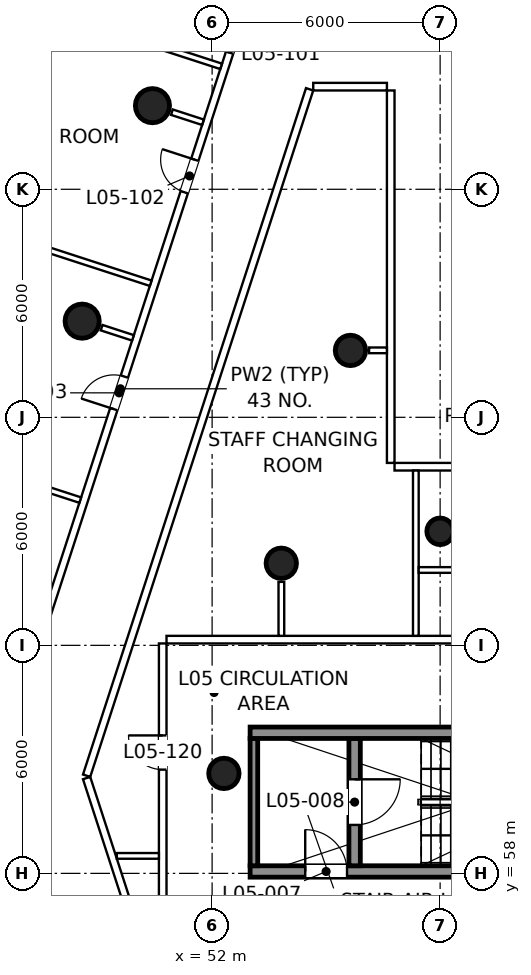
"""IFC4 building model, lengths in metres.
Left out: names, types, materials, properties, quantities, classifications, styles, units other than length and angle.
Written with IfcOpenShell. Run it as: python <this file> out.ifc"""

import sys

from ifc_helpers import new_model, si_unit, direction, frame, frame_2d, origin, origin_2d, place, context, subcontext, project, spatial, rectangle, circle, extrude, element, fill, save


model = new_model("IFC4")
c1 = context("Model", 3, precision=1e-05, world=origin(), true_north=direction((0.0, 1.0)))
c2 = subcontext(c1, "Body", "Model", "MODEL_VIEW")
j1 = project(units=[si_unit("LENGTHUNIT", "METRE"), si_unit("PLANEANGLEUNIT", "RADIAN")], contexts=[c1])
p1 = place(None, origin())
s1 = spatial("IfcSite", under=j1, at=p1, CompositionType="ELEMENT")
p2 = place(p1, origin())
s2 = spatial("IfcBuilding", under=s1, at=p2, CompositionType="ELEMENT")
p3 = place(p2, frame((0.0, 0.0, 34.0)))
s3 = spatial("IfcBuildingStorey", under=s2, at=p3, CompositionType="ELEMENT", Elevation=34.0)
for number, where, z_axis, x_axis in (
    (1, (50.43, 78.2, 0.0), (0.0, 0.0, 1.0), (1.0, 0.0, 0.0)),
    (2, (48.58, 72.53, 0.0), (0.0, 0.0, 1.0), (1.0, 0.0, 0.0)),
):
    element("IfcColumn", number, at=place(p3, frame(where, z_axis=z_axis, x_axis=x_axis)), inside=s3, PredefinedType="COLUMN", context=c2, shape_type="SweptSolid", body=[
        extrude(circle(Radius=0.45, at=origin_2d()), origin(), (0.0, 0.0, 1.0), 5.0),
    ])
for number, where, z_axis, x_axis in (
    (3, (52.31, 60.63, 0.0), (0.0, 0.0, 1.0), (1.0, 0.0, 0.0)),
    (4, (55.64, 71.76, 0.0), (0.0, 0.0, 1.0), (1.0, 0.0, 0.0)),
    (5, (53.82, 66.16, 0.0), (0.0, 0.0, 1.0), (1.0, 0.0, 0.0)),
):
    element("IfcColumn", number, at=place(p3, frame(where, z_axis=z_axis, x_axis=x_axis)), inside=s3, PredefinedType="COLUMN", context=c2, shape_type="SweptSolid", body=[
        extrude(circle(Radius=0.4, at=origin_2d()), origin(), (0.0, 0.0, 1.0), 5.0),
    ])
p4 = place(p3, frame((58.0, 67.0, 0.0), z_axis=(0.0, 0.0, 1.0), x_axis=(1.0, 0.0, 0.0)))
e6 = element("IfcColumn", 6, at=p4, inside=s3, PredefinedType="COLUMN", context=c2, shape_type="SweptSolid", body=[
    extrude(circle(Radius=0.35, at=origin_2d()), origin(), (0.0, 0.0, 1.0), 5.0),
])
p5 = place(p3, frame((53.0, 58.05, 0.0), z_axis=(0.0, 0.0, 1.0), x_axis=(1.0, 0.0, 0.0)))
e7 = element("IfcWall", 7, at=p5, inside=s3, PredefinedType="SHEAR", context=c2, shape_type="SweptSolid", body=[
    extrude(rectangle(XDim=11.9, YDim=0.3, at=frame_2d((5.95, 0.0))), origin(), (0.0, 0.0, 1.0), 5.0),
])
p6 = place(p5, frame((1.45, 0.0, 0.0)))
e8 = element("IfcOpeningElement", 8, at=p6, cuts=e7, PredefinedType="OPENING", context=c2, shape_type="SweptSolid", body=[
    extrude(rectangle(XDim=1.1, YDim=2.1, at=frame_2d((0.55, 1.05))), frame((0.0, 0.16, 0.0), z_axis=(0.0, -1.0, 0.0), x_axis=(1.0, 0.0, 0.0)), (0.0, 0.0, 1.0), 0.32),
])
p7 = place(p3, frame((53.1, 58.2, 0.0), z_axis=(0.0, 0.0, 1.0), x_axis=(0.0, 1.0, 0.0)))
e9 = element("IfcWall", 9, at=p7, inside=s3, PredefinedType="SHEAR", context=c2, shape_type="SweptSolid", body=[
    extrude(rectangle(XDim=3.35, YDim=0.2, at=frame_2d((1.675, 0.0))), origin(), (0.0, 0.0, 1.0), 5.0),
])
p8 = place(p3, frame((55.75, 58.2, 0.0), z_axis=(0.0, 0.0, 1.0), x_axis=(0.0, 1.0, 0.0)))
e10 = element("IfcWall", 10, at=p8, inside=s3, PredefinedType="SHEAR", context=c2, shape_type="SweptSolid", body=[
    extrude(rectangle(XDim=3.35, YDim=0.3, at=frame_2d((1.675, 0.0))), origin(), (0.0, 0.0, 1.0), 5.0),
])
p9 = place(p8, frame((1.075, 0.0, 0.0)))
e11 = element("IfcOpeningElement", 11, at=p9, cuts=e10, PredefinedType="OPENING", context=c2, shape_type="SweptSolid", body=[
    extrude(rectangle(XDim=1.2, YDim=2.1, at=frame_2d((0.6, 1.05))), frame((0.0, 0.16, 0.0), z_axis=(0.0, -1.0, 0.0), x_axis=(1.0, 0.0, 0.0)), (0.0, 0.0, 1.0), 0.32),
])
p10 = place(p3, frame((53.0, 61.7, 0.0), z_axis=(0.0, 0.0, 1.0), x_axis=(1.0, 0.0, 0.0)))
e12 = element("IfcWall", 12, at=p10, inside=s3, PredefinedType="SHEAR", context=c2, shape_type="SweptSolid", body=[
    extrude(rectangle(XDim=11.9, YDim=0.3, at=frame_2d((5.95, 0.0))), origin(), (0.0, 0.0, 1.0), 5.0),
])
p11 = place(p3, frame((48.757, 52.882, 0.0), z_axis=(0.0, 0.0, 1.0), x_axis=(-0.309030308026, 0.951052190325, 0.0)))
e13 = element("IfcWall", 13, at=p11, inside=s3, PredefinedType="PARTITIONING", context=c2, shape_type="SweptSolid", body=[
    extrude(rectangle(XDim=8.019, YDim=0.2, at=frame_2d((4.009, 0.0))), origin(), (0.0, 0.0, 1.0), 3.9),
])
p12 = place(p11, frame((6.33, 0.0, 0.0)))
e14 = element("IfcOpeningElement", 14, at=p12, cuts=e13, PredefinedType="OPENING", context=c2, shape_type="SweptSolid", body=[
    extrude(rectangle(XDim=0.9, YDim=2.1, at=frame_2d((0.45, 1.05))), frame((0.0, 0.11, 0.0), z_axis=(0.0, -1.0, 0.0), x_axis=(1.0, 0.0, 0.0)), (0.0, 0.0, 1.0), 0.22),
])
p13 = place(p11, frame((2.288, 0.0, 0.0)))
e15 = element("IfcOpeningElement", 15, at=p13, cuts=e13, PredefinedType="OPENING", context=c2, shape_type="SweptSolid", body=[
    extrude(rectangle(XDim=0.9, YDim=2.1, at=frame_2d((0.45, 1.05))), frame((0.0, 0.11, 0.0), z_axis=(0.0, -1.0, 0.0), x_axis=(1.0, 0.0, 0.0)), (0.0, 0.0, 1.0), 0.22),
])
p14 = place(p3, frame((46.279, 60.57, 0.0), z_axis=(0.0, 0.0, 1.0), x_axis=(0.309020575415, 0.951055352737, 0.0)))
e16 = element("IfcWall", 16, at=p14, inside=s3, PredefinedType="PARTITIONING", context=c2, shape_type="SweptSolid", body=[
    extrude(rectangle(XDim=21.409, YDim=0.2, at=frame_2d((10.704, 0.0))), origin(), (0.0, 0.0, 1.0), 3.9),
])
p15 = place(p14, frame((20.005, 0.0, 0.0)))
e17 = element("IfcOpeningElement", 17, at=p15, cuts=e16, PredefinedType="OPENING", context=c2, shape_type="SweptSolid", body=[
    extrude(rectangle(XDim=0.8, YDim=2.1, at=frame_2d((0.4, 1.05))), frame((0.0, 0.11, 0.0), z_axis=(0.0, -1.0, 0.0), x_axis=(1.0, 0.0, 0.0)), (0.0, 0.0, 1.0), 0.22),
])
p16 = place(p14, frame((16.142, 0.0, 0.0)))
e18 = element("IfcOpeningElement", 18, at=p16, cuts=e16, PredefinedType="OPENING", context=c2, shape_type="SweptSolid", body=[
    extrude(rectangle(XDim=0.9, YDim=2.1, at=frame_2d((0.45, 1.05))), frame((0.0, 0.11, 0.0), z_axis=(0.0, -1.0, 0.0), x_axis=(1.0, 0.0, 0.0)), (0.0, 0.0, 1.0), 0.22),
])
p17 = place(p14, frame((10.142, 0.0, 0.0)))
e19 = element("IfcOpeningElement", 19, at=p17, cuts=e16, PredefinedType="OPENING", context=c2, shape_type="SweptSolid", body=[
    extrude(rectangle(XDim=0.9, YDim=2.1, at=frame_2d((0.45, 1.05))), frame((0.0, 0.11, 0.0), z_axis=(0.0, -1.0, 0.0), x_axis=(1.0, 0.0, 0.0)), (0.0, 0.0, 1.0), 0.22),
])
p18 = place(p14, frame((3.33, 0.0, 0.0)))
e20 = element("IfcOpeningElement", 20, at=p18, cuts=e16, PredefinedType="OPENING", context=c2, shape_type="SweptSolid", body=[
    extrude(rectangle(XDim=0.9, YDim=2.1, at=frame_2d((0.45, 1.05))), frame((0.0, 0.11, 0.0), z_axis=(0.0, -1.0, 0.0), x_axis=(1.0, 0.0, 0.0)), (0.0, 0.0, 1.0), 0.22),
])
p19 = place(p3, frame((68.75, 68.7, 0.0), z_axis=(0.0, 0.0, 1.0), x_axis=(-1.0, 0.0, 0.0)))
e21 = element("IfcWall", 21, at=p19, inside=s3, PredefinedType="PARTITIONING", context=c2, shape_type="SweptSolid", body=[
    extrude(rectangle(XDim=11.95, YDim=0.2, at=frame_2d((5.975, 0.0))), origin(), (0.0, 0.0, 1.0), 4.6),
])
p20 = place(p19, frame((5.195, 0.0, 0.0)))
e22 = element("IfcOpeningElement", 22, at=p20, cuts=e21, PredefinedType="OPENING", context=c2, shape_type="SweptSolid", body=[
    extrude(rectangle(XDim=0.9, YDim=2.1, at=frame_2d((0.45, 1.05))), frame((0.0, 0.11, 0.0), z_axis=(0.0, -1.0, 0.0), x_axis=(1.0, 0.0, 0.0)), (0.0, 0.0, 1.0), 0.22),
])
p21 = place(p3, frame((56.7, 68.8, 0.0), z_axis=(0.0, 0.0, 1.0), x_axis=(0.0, 1.0, 0.0)))
e23 = element("IfcWall", 23, at=p21, inside=s3, PredefinedType="PARTITIONING", context=c2, shape_type="SweptSolid", body=[
    extrude(rectangle(XDim=9.8, YDim=0.2, at=frame_2d((4.9, 0.0))), origin(), (0.0, 0.0, 1.0), 4.0),
])
p22 = place(p3, frame((56.6, 78.7, 0.0), z_axis=(0.0, 0.0, 1.0), x_axis=(-1.0, 0.0, 0.0)))
e24 = element("IfcWall", 24, at=p22, inside=s3, PredefinedType="PARTITIONING", context=c2, shape_type="SweptSolid", body=[
    extrude(rectangle(XDim=1.939, YDim=0.2, at=frame_2d((0.97, 0.0))), origin(), (0.0, 0.0, 1.0), 4.6),
])
p23 = place(p3, frame((54.566, 78.631, 0.0), z_axis=(0.0, 0.0, 1.0), x_axis=(-0.309021827521, -0.951054945897, 0.0)))
e25 = element("IfcWall", 25, at=p23, inside=s3, PredefinedType="PARTITIONING", context=c2, shape_type="SweptSolid", body=[
    extrude(rectangle(XDim=18.99, YDim=0.2, at=frame_2d((9.495, 0.0))), origin(), (0.0, 0.0, 1.0), 4.6),
])
p24 = place(p3, frame((48.698, 60.508, 0.0), z_axis=(0.0, 0.0, 1.0), x_axis=(0.308999759659, -0.951062116021, 0.0)))
e26 = element("IfcWall", 26, at=p24, inside=s3, PredefinedType="PARTITIONING", context=c2, shape_type="SweptSolid", body=[
    extrude(rectangle(XDim=6.524, YDim=0.2, at=frame_2d((3.262, 0.0))), origin(), (0.0, 0.0, 1.0), 4.6),
])
p25 = place(p3, frame((50.7, 55.7, 0.0), z_axis=(0.0, 0.0, 1.0), x_axis=(0.0, 1.0, 0.0)))
e27 = element("IfcWall", 27, at=p25, inside=s3, PredefinedType="PARTITIONING", context=c2, shape_type="SweptSolid", body=[
    extrude(rectangle(XDim=8.35, YDim=0.2, at=frame_2d((4.175, 0.0))), origin(), (0.0, 0.0, 1.0), 4.6),
])
p26 = place(p25, frame((5.03, 0.0, 0.0)))
e28 = element("IfcOpeningElement", 28, at=p26, cuts=e27, PredefinedType="OPENING", context=c2, shape_type="SweptSolid", body=[
    extrude(rectangle(XDim=0.9, YDim=2.1, at=frame_2d((0.45, 1.05))), frame((0.0, 0.11, 0.0), z_axis=(0.0, -1.0, 0.0), x_axis=(1.0, 0.0, 0.0)), (0.0, 0.0, 1.0), 0.22),
])
p27 = place(p3, frame((50.8, 64.15, 0.0), z_axis=(0.0, 0.0, 1.0), x_axis=(1.0, 0.0, 0.0)))
e29 = element("IfcWall", 29, at=p27, inside=s3, PredefinedType="PARTITIONING", context=c2, shape_type="SweptSolid", body=[
    extrude(rectangle(XDim=16.3, YDim=0.2, at=frame_2d((8.15, 0.0))), origin(), (0.0, 0.0, 1.0), 4.0),
])
p28 = place(p27, frame((11.031, 0.0, 0.0)))
e30 = element("IfcOpeningElement", 30, at=p28, cuts=e29, PredefinedType="OPENING", context=c2, shape_type="SweptSolid", body=[
    extrude(rectangle(XDim=0.9, YDim=2.1, at=frame_2d((0.45, 1.05))), frame((0.0, 0.11, 0.0), z_axis=(0.0, -1.0, 0.0), x_axis=(1.0, 0.0, 0.0)), (0.0, 0.0, 1.0), 0.22),
])
p29 = place(p3, frame((45.98, 81.268, 0.0), z_axis=(0.0, 0.0, 1.0), x_axis=(0.951060241863, -0.309005528021, 0.0)))
e31 = element("IfcWall", 31, at=p29, inside=s3, PredefinedType="PARTITIONING", context=c2, shape_type="SweptSolid", body=[
    extrude(rectangle(XDim=6.58, YDim=0.15, at=frame_2d((3.29, 0.0))), origin(), (0.0, 0.0, 1.0), 4.1),
])
p30 = place(p3, frame((44.126, 75.561, 0.0), z_axis=(0.0, 0.0, 1.0), x_axis=(0.95105288048, -0.309028184041, 0.0)))
e32 = element("IfcWall", 32, at=p30, inside=s3, PredefinedType="PARTITIONING", context=c2, shape_type="SweptSolid", body=[
    extrude(rectangle(XDim=6.58, YDim=0.15, at=frame_2d((3.29, 0.0))), origin(), (0.0, 0.0, 1.0), 4.1),
])
p31 = place(p3, frame((42.272, 69.855, 0.0), z_axis=(0.0, 0.0, 1.0), x_axis=(0.951049337045, -0.309039088961, 0.0)))
e33 = element("IfcWall", 33, at=p31, inside=s3, PredefinedType="PARTITIONING", context=c2, shape_type="SweptSolid", body=[
    extrude(rectangle(XDim=6.58, YDim=0.15, at=frame_2d((3.29, 0.0))), origin(), (0.0, 0.0, 1.0), 4.1),
])
p32 = place(p3, frame((57.361, 64.25, 0.0), z_axis=(0.0, 0.0, 1.0), x_axis=(0.0, 1.0, 0.0)))
e34 = element("IfcWall", 34, at=p32, inside=s3, PredefinedType="PARTITIONING", context=c2, shape_type="SweptSolid", body=[
    extrude(rectangle(XDim=4.35, YDim=0.15, at=frame_2d((2.175, 0.0))), origin(), (0.0, 0.0, 1.0), 4.6),
])
p33 = place(p3, frame((49.492, 58.46, 0.0), z_axis=(0.0, 0.0, 1.0), x_axis=(1.0, 0.0, 0.0)))
e35 = element("IfcWall", 35, at=p33, inside=s3, PredefinedType="PARTITIONING", context=c2, shape_type="SweptSolid", body=[
    extrude(rectangle(XDim=1.108, YDim=0.15, at=frame_2d((0.554, 0.0))), origin(), (0.0, 0.0, 1.0), 4.6),
])
p34 = place(p3, frame((57.436, 65.983, 0.0), z_axis=(0.0, 0.0, 1.0), x_axis=(1.0, 0.0, 0.0)))
e36 = element("IfcWall", 36, at=p34, inside=s3, PredefinedType="PARTITIONING", context=c2, shape_type="SweptSolid", body=[
    extrude(rectangle(XDim=11.314, YDim=0.15, at=frame_2d((5.657, 0.0))), origin(), (0.0, 0.0, 1.0), 4.6),
])
p35 = place(p3, frame((50.942, 78.029, 0.0), z_axis=(0.0, 0.0, 1.0), x_axis=(0.951040325466, -0.309066820183, 0.0)))
e37 = element("IfcWall", 37, at=p35, inside=s3, PredefinedType="PARTITIONING", context=c2, shape_type="SweptSolid", body=[
    extrude(rectangle(XDim=0.86, YDim=0.15, at=frame_2d((0.43, 0.0))), origin(), (0.0, 0.0, 1.0), 4.6),
])
p36 = place(p3, frame((49.092, 72.359, 0.0), z_axis=(0.0, 0.0, 1.0), x_axis=(0.951075416717, -0.308958818803, 0.0)))
e38 = element("IfcWall", 38, at=p36, inside=s3, PredefinedType="PARTITIONING", context=c2, shape_type="SweptSolid", body=[
    extrude(rectangle(XDim=0.868, YDim=0.15, at=frame_2d((0.434, 0.0))), origin(), (0.0, 0.0, 1.0), 4.6),
])
p37 = place(p3, frame((56.13, 71.762, 0.0), z_axis=(0.0, 0.0, 1.0), x_axis=(1.0, 0.0, 0.0)))
e39 = element("IfcWall", 39, at=p37, inside=s3, PredefinedType="PARTITIONING", context=c2, shape_type="SweptSolid", body=[
    extrude(rectangle(XDim=0.47, YDim=0.15, at=frame_2d((0.235, 0.0))), origin(), (0.0, 0.0, 1.0), 4.0),
])
p38 = place(p3, frame((53.822, 65.67, 0.0), z_axis=(0.0, 0.0, 1.0), x_axis=(0.0, -1.0, 0.0)))
e40 = element("IfcWall", 40, at=p38, inside=s3, PredefinedType="PARTITIONING", context=c2, shape_type="SweptSolid", body=[
    extrude(rectangle(XDim=1.42, YDim=0.15, at=frame_2d((0.71, 0.0))), origin(), (0.0, 0.0, 1.0), 4.0),
])
p39 = place(p6, origin())
e41 = element("IfcDoor", 41, at=p39, inside=s3, OperationType="SINGLE_SWING_LEFT", PredefinedType="DOOR", context=c2, shape_type="SweptSolid", body=[
    extrude(rectangle(XDim=1.1, YDim=2.1, at=frame_2d((0.55, 1.05))), frame((0.0, 0.025, 0.0), z_axis=(0.0, -1.0, 0.0), x_axis=(1.0, 0.0, 0.0)), (0.0, 0.0, 1.0), 0.05),
])
fill(e8, e41)
p40 = place(p9, frame((1.2, 0.0, 0.0), z_axis=(0.0, 0.0, 1.0), x_axis=(-1.0, 0.0, 0.0)))
e42 = element("IfcDoor", 42, at=p40, inside=s3, OperationType="SINGLE_SWING_LEFT", PredefinedType="DOOR", context=c2, shape_type="SweptSolid", body=[
    extrude(rectangle(XDim=1.2, YDim=2.1, at=frame_2d((0.6, 1.05))), frame((0.0, 0.025, 0.0), z_axis=(0.0, -1.0, 0.0), x_axis=(1.0, 0.0, 0.0)), (0.0, 0.0, 1.0), 0.05),
])
fill(e11, e42)
p41 = place(p15, origin())
e43 = element("IfcDoor", 43, at=p41, inside=s3, OperationType="SINGLE_SWING_LEFT", PredefinedType="DOOR", context=c2, shape_type="SweptSolid", body=[
    extrude(rectangle(XDim=0.8, YDim=2.1, at=frame_2d((0.4, 1.05))), frame((0.0, 0.025, 0.0), z_axis=(0.0, -1.0, 0.0), x_axis=(1.0, 0.0, 0.0)), (0.0, 0.0, 1.0), 0.05),
])
fill(e17, e43)
p42 = place(p16, origin())
e44 = element("IfcDoor", 44, at=p42, inside=s3, OperationType="SINGLE_SWING_RIGHT", PredefinedType="DOOR", context=c2, shape_type="SweptSolid", body=[
    extrude(rectangle(XDim=0.9, YDim=2.1, at=frame_2d((0.45, 1.05))), frame((0.0, 0.025, 0.0), z_axis=(0.0, -1.0, 0.0), x_axis=(1.0, 0.0, 0.0)), (0.0, 0.0, 1.0), 0.05),
])
fill(e18, e44)
p43 = place(p17, origin())
e45 = element("IfcDoor", 45, at=p43, inside=s3, OperationType="SINGLE_SWING_LEFT", PredefinedType="DOOR", context=c2, shape_type="SweptSolid", body=[
    extrude(rectangle(XDim=0.9, YDim=2.1, at=frame_2d((0.45, 1.05))), frame((0.0, 0.025, 0.0), z_axis=(0.0, -1.0, 0.0), x_axis=(1.0, 0.0, 0.0)), (0.0, 0.0, 1.0), 0.05),
])
fill(e19, e45)
p44 = place(p26, origin())
e46 = element("IfcDoor", 46, at=p44, inside=s3, OperationType="SINGLE_SWING_RIGHT", PredefinedType="DOOR", context=c2, shape_type="SweptSolid", body=[
    extrude(rectangle(XDim=0.9, YDim=2.1, at=frame_2d((0.45, 1.05))), frame((0.0, 0.025, 0.0), z_axis=(0.0, -1.0, 0.0), x_axis=(1.0, 0.0, 0.0)), (0.0, 0.0, 1.0), 0.05),
])
fill(e28, e46)
save(model, sys.argv[1])
